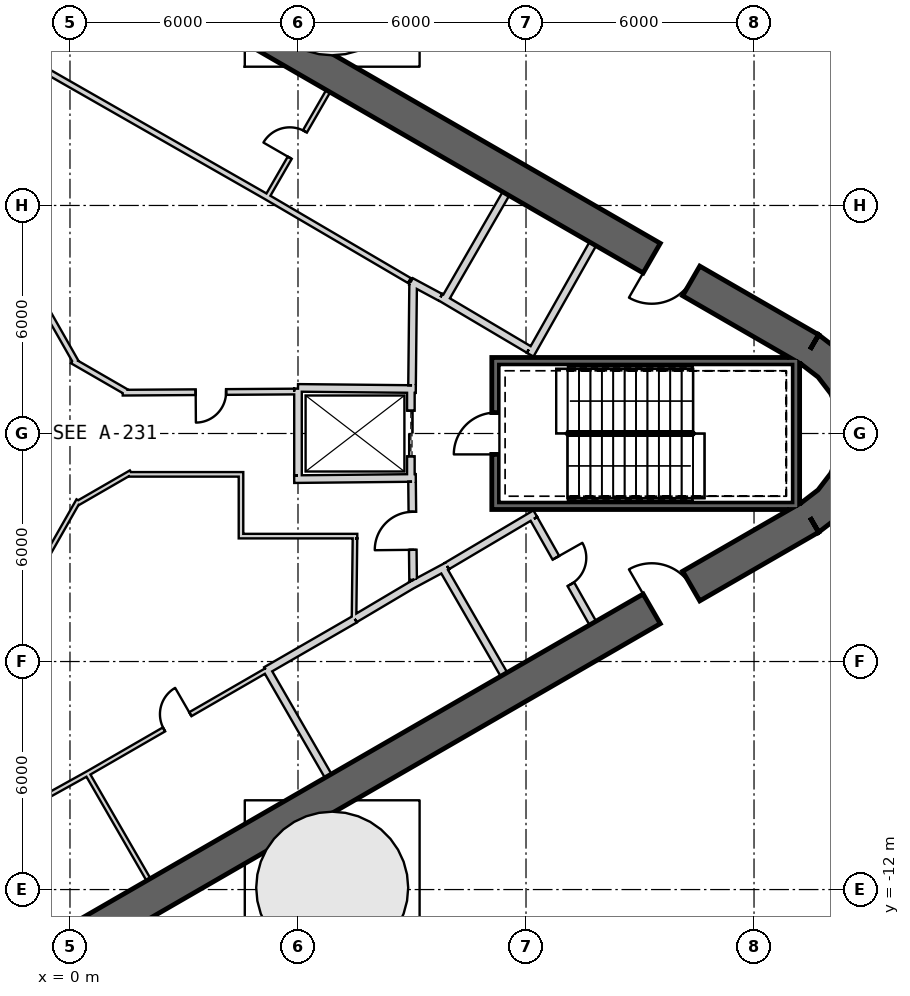
"""IFC4 building model, lengths in metres.
Left out: names, types, materials, properties, quantities, classifications, styles, units other than length and angle.
Written with IfcOpenShell. Run it as: python <this file> out.ifc"""

import sys

from ifc_helpers import new_model, si_unit, direction, frame, frame_2d, origin, place, context, subcontext, project, spatial, polyline, rectangle, outline, extrude, element, fill, save


model = new_model("IFC4")
c1 = context("Model", 3, precision=1e-05, world=origin(), true_north=direction((0.0, 1.0)))
c2 = subcontext(c1, "Body", "Model", "MODEL_VIEW")
j1 = project(units=[si_unit("LENGTHUNIT", "METRE"), si_unit("PLANEANGLEUNIT", "RADIAN")], contexts=[c1])
p1 = place(None, origin())
s1 = spatial("IfcSite", under=j1, at=p1, CompositionType="ELEMENT")
p2 = place(p1, origin())
s2 = spatial("IfcBuilding", under=s1, at=p2, CompositionType="ELEMENT")
p3 = place(p2, frame((0.0, 0.0, 283.7)))
s3 = spatial("IfcBuildingStorey", under=s2, at=p3, CompositionType="ELEMENT", Elevation=283.7)
p4 = place(p3, frame((19.475, 2.208, 0.0), z_axis=(0.0, 0.0, 1.0), x_axis=(-0.866028369851, 0.499994862586, 0.0)))
e1 = element("IfcWall", 1, at=p4, inside=s3, PredefinedType="SHEAR", context=c2, shape_type="SweptSolid", body=[
    extrude(rectangle(XDim=31.523, YDim=0.9, at=frame_2d((15.762, 0.0))), origin(), (0.0, 0.0, 1.0), 9.0),
])
p5 = place(p4, frame((3.612, 0.0, 0.0)))
e2 = element("IfcOpeningElement", 2, at=p5, cuts=e1, PredefinedType="OPENING", context=c2, shape_type="SweptSolid", body=[
    extrude(rectangle(XDim=1.2, YDim=2.4, at=frame_2d((0.6, 1.2))), frame((0.0, 0.46, 0.0), z_axis=(0.0, -1.0, 0.0), x_axis=(1.0, 0.0, 0.0)), (0.0, 0.0, 1.0), 0.92),
])
p6 = place(p4, frame((26.712, 0.0, 0.0)))
e3 = element("IfcOpeningElement", 3, at=p6, cuts=e1, PredefinedType="OPENING", context=c2, shape_type="SweptSolid", body=[
    extrude(rectangle(XDim=1.2, YDim=2.4, at=frame_2d((0.6, 1.2))), frame((0.0, 0.46, 0.0), z_axis=(0.0, -1.0, 0.0), x_axis=(1.0, 0.0, 0.0)), (0.0, 0.0, 1.0), 0.92),
])
p7 = place(p3, frame((-7.825, -17.97, 0.0), z_axis=(0.0, 0.0, 1.0), x_axis=(0.866028369851, 0.499994862586, 0.0)))
e4 = element("IfcWall", 4, at=p7, inside=s3, PredefinedType="SHEAR", context=c2, shape_type="SweptSolid", body=[
    extrude(rectangle(XDim=31.523, YDim=0.9, at=frame_2d((15.762, 0.0))), origin(), (0.0, 0.0, 1.0), 9.0),
])
p8 = place(p7, frame((26.712, 0.0, 0.0)))
e5 = element("IfcOpeningElement", 5, at=p8, cuts=e4, PredefinedType="OPENING", context=c2, shape_type="SweptSolid", body=[
    extrude(rectangle(XDim=1.2, YDim=2.4, at=frame_2d((0.6, 1.2))), frame((0.0, 0.46, 0.0), z_axis=(0.0, -1.0, 0.0), x_axis=(1.0, 0.0, 0.0)), (0.0, 0.0, 1.0), 0.92),
])
p9 = place(p7, frame((3.612, 0.0, 0.0)))
e6 = element("IfcOpeningElement", 6, at=p9, cuts=e4, PredefinedType="OPENING", context=c2, shape_type="SweptSolid", body=[
    extrude(rectangle(XDim=1.2, YDim=2.4, at=frame_2d((0.6, 1.2))), frame((0.0, 0.46, 0.0), z_axis=(0.0, -1.0, 0.0), x_axis=(1.0, 0.0, 0.0)), (0.0, 0.0, 1.0), 0.92),
])
p10 = place(p3, origin())
e7 = element("IfcWall", 7, at=p10, inside=s3, PredefinedType="SHEAR", context=c2, shape_type="SweptSolid", body=[
    extrude(outline(polyline([(19.7, -2.598), (20.321, -2.121), (20.798, -1.5), (21.098, -0.777), (21.2, 0.0), (21.098, 0.777), (20.798, 1.5), (20.321, 2.121), (19.7, 2.598), (19.25, 1.819), (19.685, 1.485), (20.019, 1.05), (20.229, 0.543), (20.3, 0.0), (20.229, -0.543), (20.019, -1.05), (19.685, -1.485), (19.25, -1.819), (19.7, -2.598)])), origin(), (0.0, 0.0, 1.0), 9.0),
])
p11 = place(p3, frame((9.847, 3.495, 0.0), z_axis=(0.0, 0.0, 1.0), x_axis=(0.499984717929, 0.866034226713, 0.0)))
e8 = element("IfcWall", 8, at=p11, inside=s3, PredefinedType="PLUMBINGWALL", context=c2, shape_type="SweptSolid", body=[
    extrude(rectangle(XDim=3.25, YDim=0.2, at=frame_2d((1.625, 0.0))), origin(), (0.0, 0.0, 1.0), 8.65),
])
p12 = place(p3, frame((12.11, 2.073, 0.0), z_axis=(0.0, 0.0, 1.0), x_axis=(0.49196600604, 0.870614408852, 0.0)))
e9 = element("IfcWall", 9, at=p12, inside=s3, PredefinedType="PLUMBINGWALL", context=c2, shape_type="SweptSolid", body=[
    extrude(rectangle(XDim=3.35, YDim=0.2, at=frame_2d((1.675, 0.0))), origin(), (0.0, 0.0, 1.0), 8.65),
])
p13 = place(p3, frame((12.073, 2.211, 0.0), z_axis=(0.0, 0.0, 1.0), x_axis=(-0.860414880418, 0.509594185166, 0.0)))
e10 = element("IfcWall", 10, at=p13, inside=s3, PredefinedType="PLUMBINGWALL", context=c2, shape_type="SweptSolid", body=[
    extrude(rectangle(XDim=2.7, YDim=0.2, at=frame_2d((1.35, 0.0))), origin(), (0.0, 0.0, 1.0), 8.65),
])
p14 = place(p3, frame((6.795, -9.01, 0.0), z_axis=(0.0, 0.0, 1.0), x_axis=(-0.499984717929, 0.866034226713, 0.0)))
e11 = element("IfcWall", 11, at=p14, inside=s3, PredefinedType="PLUMBINGWALL", context=c2, shape_type="SweptSolid", body=[
    extrude(rectangle(XDim=3.25, YDim=0.2, at=frame_2d((1.625, 0.0))), origin(), (0.0, 0.0, 1.0), 8.65),
])
p15 = place(p3, frame((5.159, -6.236, 0.0), z_axis=(0.0, 0.0, 1.0), x_axis=(0.866036505625, 0.499980770555, 0.0)))
e12 = element("IfcWall", 12, at=p15, inside=s3, PredefinedType="PLUMBINGWALL", context=c2, shape_type="SweptSolid", body=[
    extrude(rectangle(XDim=2.7, YDim=0.2, at=frame_2d((1.35, 0.0))), origin(), (0.0, 0.0, 1.0), 8.65),
])
p16 = place(p3, frame((9.795, -3.525, 0.0), z_axis=(0.0, 0.0, 1.0), x_axis=(0.499984717929, -0.866034226713, 0.0)))
e13 = element("IfcWall", 13, at=p16, inside=s3, PredefinedType="PLUMBINGWALL", context=c2, shape_type="SweptSolid", body=[
    extrude(rectangle(XDim=3.25, YDim=0.2, at=frame_2d((1.625, 0.0))), origin(), (0.0, 0.0, 1.0), 8.65),
])
p17 = place(p3, frame((8.974, -3.999, 0.0), z_axis=(0.0, 0.0, 1.0), x_axis=(0.880907015104, 0.473289373154, 0.0)))
e14 = element("IfcWall", 14, at=p17, inside=s3, PredefinedType="PLUMBINGWALL", context=c2, shape_type="SweptSolid", body=[
    extrude(rectangle(XDim=1.078, YDim=0.2, at=frame_2d((0.539, 0.0))), origin(), (0.0, 0.0, 1.0), 8.65),
])
p18 = place(p3, frame((7.493, -4.878, 0.0), z_axis=(0.0, 0.0, 1.0), x_axis=(0.859981807212, 0.510324691999, 0.0)))
e15 = element("IfcWall", 15, at=p18, inside=s3, PredefinedType="PLUMBINGWALL", context=c2, shape_type="SweptSolid", body=[
    extrude(rectangle(XDim=1.845, YDim=0.2, at=frame_2d((0.922, 0.0))), origin(), (0.0, 0.0, 1.0), 8.65),
])
p19 = place(p3, frame((19.2, 1.9, -0.4), z_axis=(0.0, 0.0, 1.0), x_axis=(-1.0, 0.0, 0.0)))
e16 = element("IfcWall", 16, at=p19, inside=s3, PredefinedType="SHEAR", context=c2, shape_type="SweptSolid", body=[
    extrude(rectangle(XDim=8.1, YDim=0.2, at=frame_2d((4.05, 0.0))), origin(), (0.0, 0.0, 1.0), 9.05),
])
p20 = place(p3, frame((19.1, -2.0, -0.4), z_axis=(0.0, 0.0, 1.0), x_axis=(0.0, 1.0, 0.0)))
e17 = element("IfcWall", 17, at=p20, inside=s3, PredefinedType="SHEAR", context=c2, shape_type="SweptSolid", body=[
    extrude(rectangle(XDim=3.8, YDim=0.2, at=frame_2d((1.9, 0.0))), origin(), (0.0, 0.0, 1.0), 9.05),
])
p21 = place(p3, frame((11.1, -1.9, -0.4), z_axis=(0.0, 0.0, 1.0), x_axis=(1.0, 0.0, 0.0)))
e18 = element("IfcWall", 18, at=p21, inside=s3, PredefinedType="SHEAR", context=c2, shape_type="SweptSolid", body=[
    extrude(rectangle(XDim=7.9, YDim=0.2, at=frame_2d((3.95, 0.0))), origin(), (0.0, 0.0, 1.0), 9.05),
])
p22 = place(p3, frame((11.2, -1.8, -0.4), z_axis=(0.0, 0.0, 1.0), x_axis=(0.0, 1.0, 0.0)))
e19 = element("IfcWall", 19, at=p22, inside=s3, PredefinedType="SHEAR", context=c2, shape_type="SweptSolid", body=[
    extrude(rectangle(XDim=3.6, YDim=0.2, at=frame_2d((1.8, 0.0))), origin(), (0.0, 0.0, 1.0), 9.05),
])
p23 = place(p22, frame((1.25, 0.0, 0.4)))
e20 = element("IfcOpeningElement", 20, at=p23, cuts=e19, PredefinedType="OPENING", context=c2, shape_type="SweptSolid", body=[
    extrude(rectangle(XDim=1.1, YDim=2.1, at=frame_2d((0.55, 1.05))), frame((0.0, 0.11, 0.0), z_axis=(0.0, -1.0, 0.0), x_axis=(1.0, 0.0, 0.0)), (0.0, 0.0, 1.0), 0.22),
])
p24 = place(p3, frame((8.97, 1.2, 0.0), z_axis=(0.0, 0.0, 1.0), x_axis=(0.0, -1.0, 0.0)))
e21 = element("IfcWall", 21, at=p24, inside=s3, PredefinedType="PLUMBINGWALL", context=c2, shape_type="SweptSolid", body=[
    extrude(rectangle(XDim=2.4, YDim=0.2, at=frame_2d((1.2, 0.0))), origin(), (0.0, 0.0, 1.0), 8.65),
])
p25 = place(p24, frame((0.6, 0.0, 0.0)))
e22 = element("IfcOpeningElement", 22, at=p25, cuts=e21, PredefinedType="OPENING", context=c2, shape_type="SweptSolid", body=[
    extrude(rectangle(XDim=1.2, YDim=2.4, at=frame_2d((0.6, 1.2))), frame((0.0, 0.11, 0.0), z_axis=(0.0, -1.0, 0.0), x_axis=(1.0, 0.0, 0.0)), (0.0, 0.0, 1.0), 0.22),
])
p26 = place(p3, frame((6.0, 1.2, 0.0), z_axis=(0.0, 0.0, 1.0), x_axis=(0.999949988, -0.010001074852, 0.0)))
e23 = element("IfcWall", 23, at=p26, inside=s3, PredefinedType="PLUMBINGWALL", context=c2, shape_type="SweptSolid", body=[
    extrude(rectangle(XDim=3.1, YDim=0.2, at=frame_2d((1.55, 0.0))), origin(), (0.0, 0.0, 1.0), 8.65),
])
p27 = place(p3, frame((5.9, -1.201, 0.0), z_axis=(0.0, 0.0, 1.0), x_axis=(0.999950064753, 0.009993397809, 0.0)))
e24 = element("IfcWall", 24, at=p27, inside=s3, PredefinedType="PLUMBINGWALL", context=c2, shape_type="SweptSolid", body=[
    extrude(rectangle(XDim=3.2, YDim=0.2, at=frame_2d((1.6, 0.0))), origin(), (0.0, 0.0, 1.0), 8.65),
])
p28 = place(p3, frame((6.0, -1.1, 0.0), z_axis=(0.0, 0.0, 1.0), x_axis=(0.0, 1.0, 0.0)))
e25 = element("IfcWall", 25, at=p28, inside=s3, PredefinedType="PLUMBINGWALL", context=c2, shape_type="SweptSolid", body=[
    extrude(rectangle(XDim=2.28, YDim=0.2, at=frame_2d((1.14, 0.0))), origin(), (0.0, 0.0, 1.0), 8.65),
])
p29 = place(p3, frame((5.17, 6.195, 0.0), z_axis=(0.0, 0.0, 1.0), x_axis=(0.499984717929, 0.866034226713, 0.0)))
e26 = element("IfcWall", 26, at=p29, inside=s3, PredefinedType="PARTITIONING", context=c2, shape_type="SweptSolid", body=[
    extrude(rectangle(XDim=3.25, YDim=0.12, at=frame_2d((1.625, 0.0))), origin(), (0.0, 0.0, 1.0), 8.65),
])
p30 = place(p29, frame((1.225, 0.0, 0.0)))
e27 = element("IfcOpeningElement", 27, at=p30, cuts=e26, PredefinedType="OPENING", context=c2, shape_type="SweptSolid", body=[
    extrude(rectangle(XDim=0.8, YDim=2.1, at=frame_2d((0.4, 1.05))), frame((0.0, 0.07, 0.0), z_axis=(0.0, -1.0, 0.0), x_axis=(1.0, 0.0, 0.0)), (0.0, 0.0, 1.0), 0.14),
])
p31 = place(p3, frame((8.974, 3.999, 0.0), z_axis=(0.0, 0.0, 1.0), x_axis=(0.880917147855, -0.473270513147, 0.0)))
e28 = element("IfcWall", 28, at=p31, inside=s3, PredefinedType="PARTITIONING", context=c2, shape_type="SweptSolid", body=[
    extrude(rectangle(XDim=0.878, YDim=0.2, at=frame_2d((0.439, 0.0))), origin(), (0.0, 0.0, 1.0), 8.65),
])
p32 = place(p3, frame((8.931, 4.025, 0.0), z_axis=(0.0, 0.0, 1.0), x_axis=(-0.862666884027, 0.505772525157, 0.0)))
e29 = element("IfcWall", 29, at=p32, inside=s3, PredefinedType="PLUMBINGWALL", context=c2, shape_type="SweptSolid", body=[
    extrude(rectangle(XDim=4.372, YDim=0.15, at=frame_2d((2.186, 0.0))), origin(), (0.0, 0.0, 1.0), 8.65),
])
p33 = place(p3, frame((5.159, 6.236, 0.0), z_axis=(0.0, 0.0, 1.0), x_axis=(-0.868105023632, 0.496380567654, 0.0)))
e30 = element("IfcWall", 30, at=p33, inside=s3, PredefinedType="PLUMBINGWALL", context=c2, shape_type="SweptSolid", body=[
    extrude(rectangle(XDim=7.072, YDim=0.15, at=frame_2d((3.536, 0.0))), origin(), (0.0, 0.0, 1.0), 8.65),
])
p34 = place(p3, frame((2.067, -11.74, 0.0), z_axis=(0.0, 0.0, 1.0), x_axis=(-0.499984717929, 0.866034226713, 0.0)))
e31 = element("IfcWall", 31, at=p34, inside=s3, PredefinedType="PARTITIONING", context=c2, shape_type="SweptSolid", body=[
    extrude(rectangle(XDim=3.25, YDim=0.12, at=frame_2d((1.625, 0.0))), origin(), (0.0, 0.0, 1.0), 8.65),
])
p35 = place(p3, frame((-1.023, -9.772, 0.0), z_axis=(0.0, 0.0, 1.0), x_axis=(0.874290944206, 0.485402250592, 0.0)))
e32 = element("IfcWall", 32, at=p35, inside=s3, PredefinedType="PARTITIONING", context=c2, shape_type="SweptSolid", body=[
    extrude(rectangle(XDim=1.723, YDim=0.12, at=frame_2d((0.861, 0.0))), origin(), (0.0, 0.0, 1.0), 8.65),
])
p36 = place(p3, frame((0.483, -8.936, 0.0), z_axis=(0.0, 0.0, 1.0), x_axis=(0.866028230842, 0.499995103361, 0.0)))
e33 = element("IfcWall", 33, at=p36, inside=s3, PredefinedType="PARTITIONING", context=c2, shape_type="SweptSolid", body=[
    extrude(rectangle(XDim=5.4, YDim=0.12, at=frame_2d((2.7, 0.0))), origin(), (0.0, 0.0, 1.0), 8.65),
])
p37 = place(p36, frame((2.3, 0.0, 0.0)))
e34 = element("IfcOpeningElement", 34, at=p37, cuts=e33, PredefinedType="OPENING", context=c2, shape_type="SweptSolid", body=[
    extrude(rectangle(XDim=0.8, YDim=2.1, at=frame_2d((0.4, 1.05))), frame((0.0, 0.07, 0.0), z_axis=(0.0, -1.0, 0.0), x_axis=(1.0, 0.0, 0.0)), (0.0, 0.0, 1.0), 0.14),
])
p38 = place(p3, frame((12.245, -2.109, 0.0), z_axis=(0.0, 0.0, 1.0), x_axis=(-0.860414880418, -0.509594185166, 0.0)))
e35 = element("IfcWall", 35, at=p38, inside=s3, PredefinedType="PARTITIONING", context=c2, shape_type="SweptSolid", body=[
    extrude(rectangle(XDim=2.7, YDim=0.2, at=frame_2d((1.35, 0.0))), origin(), (0.0, 0.0, 1.0), 8.65),
])
p39 = place(p3, frame((13.758, -4.99, 0.0), z_axis=(0.0, 0.0, 1.0), x_axis=(-0.491993409184, 0.87059892334, 0.0)))
e36 = element("IfcWall", 36, at=p39, inside=s3, PredefinedType="PARTITIONING", context=c2, shape_type="SweptSolid", body=[
    extrude(rectangle(XDim=3.15, YDim=0.2, at=frame_2d((1.575, 0.0))), origin(), (0.0, 0.0, 1.0), 8.65),
])
p40 = place(p39, frame((1.175, 0.0, 0.0)))
e37 = element("IfcOpeningElement", 37, at=p40, cuts=e36, PredefinedType="OPENING", context=c2, shape_type="SweptSolid", body=[
    extrude(rectangle(XDim=0.8, YDim=2.1, at=frame_2d((0.4, 1.05))), frame((0.0, 0.11, 0.0), z_axis=(0.0, -1.0, 0.0), x_axis=(1.0, 0.0, 0.0)), (0.0, 0.0, 1.0), 0.22),
])
p41 = place(p3, frame((9.001, 1.27, 0.0), z_axis=(0.0, 0.0, 1.0), x_axis=(0.01074821465, 0.999942236273, 0.0)))
e38 = element("IfcWall", 38, at=p41, inside=s3, PredefinedType="PARTITIONING", context=c2, shape_type="SweptSolid", body=[
    extrude(rectangle(XDim=2.726, YDim=0.2, at=frame_2d((1.363, 0.0))), origin(), (0.0, 0.0, 1.0), 8.65),
])
p42 = place(p3, frame((9.029, -3.851, 0.0), z_axis=(0.0, 0.0, 1.0), x_axis=(-0.010783593937, 0.99994185536, 0.0)))
e39 = element("IfcWall", 39, at=p42, inside=s3, PredefinedType="PARTITIONING", context=c2, shape_type="SweptSolid", body=[
    extrude(rectangle(XDim=2.581, YDim=0.2, at=frame_2d((1.291, 0.0))), origin(), (0.0, 0.0, 1.0), 8.65),
])
p43 = place(p42, frame((0.791, 0.0, 0.0)))
e40 = element("IfcOpeningElement", 40, at=p43, cuts=e39, PredefinedType="OPENING", context=c2, shape_type="SweptSolid", body=[
    extrude(rectangle(XDim=1.0, YDim=2.1, at=frame_2d((0.5, 1.05))), frame((0.0, 0.11, 0.0), z_axis=(0.0, -1.0, 0.0), x_axis=(1.0, 0.0, 0.0)), (0.0, 0.0, 1.0), 0.22),
])
p44 = place(p3, frame((1.388, 1.074, 0.0), z_axis=(0.0, 0.0, 1.0), x_axis=(0.99997856967, 0.006546770205, 0.0)))
e41 = element("IfcWall", 41, at=p44, inside=s3, PredefinedType="PLUMBINGWALL", context=c2, shape_type="SweptSolid", body=[
    extrude(rectangle(XDim=4.512, YDim=0.15, at=frame_2d((2.256, 0.0))), origin(), (0.0, 0.0, 1.0), 8.65),
])
p45 = place(p44, frame((1.92, 0.0, 0.0)))
e42 = element("IfcOpeningElement", 42, at=p45, cuts=e41, PredefinedType="OPENING", context=c2, shape_type="SweptSolid", body=[
    extrude(rectangle(XDim=0.8, YDim=2.1, at=frame_2d((0.4, 1.05))), frame((0.0, 0.085, 0.0), z_axis=(0.0, -1.0, 0.0), x_axis=(1.0, 0.0, 0.0)), (0.0, 0.0, 1.0), 0.17),
])
p46 = place(p3, frame((0.062, 1.914, 0.0), z_axis=(0.0, 0.0, 1.0), x_axis=(0.866018462269, -0.500012022864, 0.0)))
e43 = element("IfcWall", 43, at=p46, inside=s3, PredefinedType="PLUMBINGWALL", context=c2, shape_type="SweptSolid", body=[
    extrude(rectangle(XDim=1.654, YDim=0.15, at=frame_2d((0.827, 0.0))), origin(), (0.0, 0.0, 1.0), 8.65),
])
p47 = place(p3, frame((-1.994, 5.661, 0.0), z_axis=(0.0, 0.0, 1.0), x_axis=(0.494341211302, -0.869267948798, 0.0)))
e44 = element("IfcWall", 44, at=p47, inside=s3, PredefinedType="PLUMBINGWALL", context=c2, shape_type="SweptSolid", body=[
    extrude(rectangle(XDim=4.361, YDim=0.15, at=frame_2d((2.18, 0.0))), origin(), (0.0, 0.0, 1.0), 8.65),
])
p48 = place(p3, frame((0.224, -1.761, 0.0), z_axis=(0.0, 0.0, 1.0), x_axis=(-0.494327216836, -0.869275907118, 0.0)))
e45 = element("IfcWall", 45, at=p48, inside=s3, PredefinedType="PARTITIONING", context=c2, shape_type="SweptSolid", body=[
    extrude(rectangle(XDim=4.487, YDim=0.12, at=frame_2d((2.244, 0.0))), origin(), (0.0, 0.0, 1.0), 8.65),
])
p49 = place(p48, frame((1.895, 0.0, 0.0)))
e46 = element("IfcOpeningElement", 46, at=p49, cuts=e45, PredefinedType="OPENING", context=c2, shape_type="SweptSolid", body=[
    extrude(rectangle(XDim=0.8, YDim=2.1, at=frame_2d((0.4, 1.05))), frame((0.0, 0.07, 0.0), z_axis=(0.0, -1.0, 0.0), x_axis=(1.0, 0.0, 0.0)), (0.0, 0.0, 1.0), 0.14),
])
p50 = place(p3, frame((1.605, -1.023, 0.0), z_axis=(0.0, 0.0, 1.0), x_axis=(-0.866001581989, -0.50004125829, 0.0)))
e47 = element("IfcWall", 47, at=p50, inside=s3, PredefinedType="PARTITIONING", context=c2, shape_type="SweptSolid", body=[
    extrude(rectangle(XDim=1.635, YDim=0.12, at=frame_2d((0.817, 0.0))), origin(), (0.0, 0.0, 1.0), 8.65),
])
p51 = place(p3, frame((4.56, -1.075, 0.0), z_axis=(0.0, 0.0, 1.0), x_axis=(-1.0, 0.0, 0.0)))
e48 = element("IfcWall", 48, at=p51, inside=s3, PredefinedType="PARTITIONING", context=c2, shape_type="SweptSolid", body=[
    extrude(rectangle(XDim=3.026, YDim=0.12, at=frame_2d((1.513, 0.0))), origin(), (0.0, 0.0, 1.0), 8.65),
])
p52 = place(p3, frame((4.5, -2.76, 0.0), z_axis=(0.0, 0.0, 1.0), x_axis=(0.0, 1.0, 0.0)))
e49 = element("IfcWall", 49, at=p52, inside=s3, PredefinedType="PARTITIONING", context=c2, shape_type="SweptSolid", body=[
    extrude(rectangle(XDim=1.625, YDim=0.12, at=frame_2d((0.812, 0.0))), origin(), (0.0, 0.0, 1.0), 8.65),
])
p53 = place(p3, frame((7.56, -2.7, 0.0), z_axis=(0.0, 0.0, 1.0), x_axis=(-1.0, 0.0, 0.0)))
e50 = element("IfcWall", 50, at=p53, inside=s3, PredefinedType="PARTITIONING", context=c2, shape_type="SweptSolid", body=[
    extrude(rectangle(XDim=3.0, YDim=0.12, at=frame_2d((1.5, 0.0))), origin(), (0.0, 0.0, 1.0), 8.65),
])
p54 = place(p3, frame((7.475, -4.865, 0.0), z_axis=(0.0, 0.0, 1.0), x_axis=(0.011716133148, 0.999931363757, 0.0)))
e51 = element("IfcWall", 51, at=p54, inside=s3, PredefinedType="PARTITIONING", context=c2, shape_type="SweptSolid", body=[
    extrude(rectangle(XDim=2.105, YDim=0.12, at=frame_2d((1.052, 0.0))), origin(), (0.0, 0.0, 1.0), 8.65),
])
p55 = place(p23, origin())
e52 = element("IfcDoor", 52, at=p55, inside=s3, OperationType="SINGLE_SWING_LEFT", PredefinedType="USERDEFINED", context=c2, shape_type="SweptSolid", body=[
    extrude(rectangle(XDim=1.1, YDim=2.1, at=frame_2d((0.55, 1.05))), frame((0.0, 0.025, 0.0), z_axis=(0.0, -1.0, 0.0), x_axis=(1.0, 0.0, 0.0)), (0.0, 0.0, 1.0), 0.05),
])
fill(e20, e52)
p56 = place(p43, origin())
e53 = element("IfcDoor", 53, at=p56, inside=s3, OperationType="SINGLE_SWING_LEFT", PredefinedType="USERDEFINED", context=c2, shape_type="SweptSolid", body=[
    extrude(rectangle(XDim=1.0, YDim=2.1, at=frame_2d((0.5, 1.05))), frame((0.0, 0.025, 0.0), z_axis=(0.0, -1.0, 0.0), x_axis=(1.0, 0.0, 0.0)), (0.0, 0.0, 1.0), 0.05),
])
fill(e40, e53)
p57 = place(p25, origin())
e54 = element("IfcDoor", 54, at=p57, inside=s3, OperationType="SLIDING_TO_LEFT", PredefinedType="USERDEFINED", context=c2, shape_type="SweptSolid", body=[
    extrude(rectangle(XDim=1.2, YDim=2.4, at=frame_2d((0.6, 1.2))), frame((0.0, 0.025, 0.0), z_axis=(0.0, -1.0, 0.0), x_axis=(1.0, 0.0, 0.0)), (0.0, 0.0, 1.0), 0.05),
])
fill(e22, e54)
p58 = place(p45, origin())
e55 = element("IfcDoor", 55, at=p58, inside=s3, OperationType="SINGLE_SWING_LEFT", PredefinedType="USERDEFINED", context=c2, shape_type="SweptSolid", body=[
    extrude(rectangle(XDim=0.8, YDim=2.1, at=frame_2d((0.4, 1.05))), frame((0.0, 0.025, 0.0), z_axis=(0.0, -1.0, 0.0), x_axis=(1.0, 0.0, 0.0)), (0.0, 0.0, 1.0), 0.05),
])
fill(e42, e55)
p59 = place(p30, origin())
e56 = element("IfcDoor", 56, at=p59, inside=s3, OperationType="SINGLE_SWING_LEFT", PredefinedType="USERDEFINED", context=c2, shape_type="SweptSolid", body=[
    extrude(rectangle(XDim=0.8, YDim=2.1, at=frame_2d((0.4, 1.05))), frame((0.0, 0.025, 0.0), z_axis=(0.0, -1.0, 0.0), x_axis=(1.0, 0.0, 0.0)), (0.0, 0.0, 1.0), 0.05),
])
fill(e27, e56)
p60 = place(p37, origin())
e57 = element("IfcDoor", 57, at=p60, inside=s3, OperationType="SINGLE_SWING_RIGHT", PredefinedType="USERDEFINED", context=c2, shape_type="SweptSolid", body=[
    extrude(rectangle(XDim=0.8, YDim=2.1, at=frame_2d((0.4, 1.05))), frame((0.0, 0.025, 0.0), z_axis=(0.0, -1.0, 0.0), x_axis=(1.0, 0.0, 0.0)), (0.0, 0.0, 1.0), 0.05),
])
fill(e34, e57)
p61 = place(p40, origin())
e58 = element("IfcDoor", 58, at=p61, inside=s3, OperationType="SINGLE_SWING_RIGHT", PredefinedType="USERDEFINED", context=c2, shape_type="SweptSolid", body=[
    extrude(rectangle(XDim=0.8, YDim=2.1, at=frame_2d((0.4, 1.05))), frame((0.0, 0.025, 0.0), z_axis=(0.0, -1.0, 0.0), x_axis=(1.0, 0.0, 0.0)), (0.0, 0.0, 1.0), 0.05),
])
fill(e37, e58)
p62 = place(p8, origin())
e59 = element("IfcDoor", 59, at=p62, inside=s3, OperationType="SINGLE_SWING_LEFT", PredefinedType="USERDEFINED", context=c2, shape_type="SweptSolid", body=[
    extrude(rectangle(XDim=1.2, YDim=2.4, at=frame_2d((0.6, 1.2))), frame((0.0, 0.025, 0.0), z_axis=(0.0, -1.0, 0.0), x_axis=(1.0, 0.0, 0.0)), (0.0, 0.0, 1.0), 0.05),
])
fill(e5, e59)
p63 = place(p5, origin())
e60 = element("IfcDoor", 60, at=p63, inside=s3, OperationType="SINGLE_SWING_RIGHT", PredefinedType="USERDEFINED", context=c2, shape_type="SweptSolid", body=[
    extrude(rectangle(XDim=1.2, YDim=2.4, at=frame_2d((0.6, 1.2))), frame((0.0, 0.025, 0.0), z_axis=(0.0, -1.0, 0.0), x_axis=(1.0, 0.0, 0.0)), (0.0, 0.0, 1.0), 0.05),
])
fill(e2, e60)
save(model, sys.argv[1])
